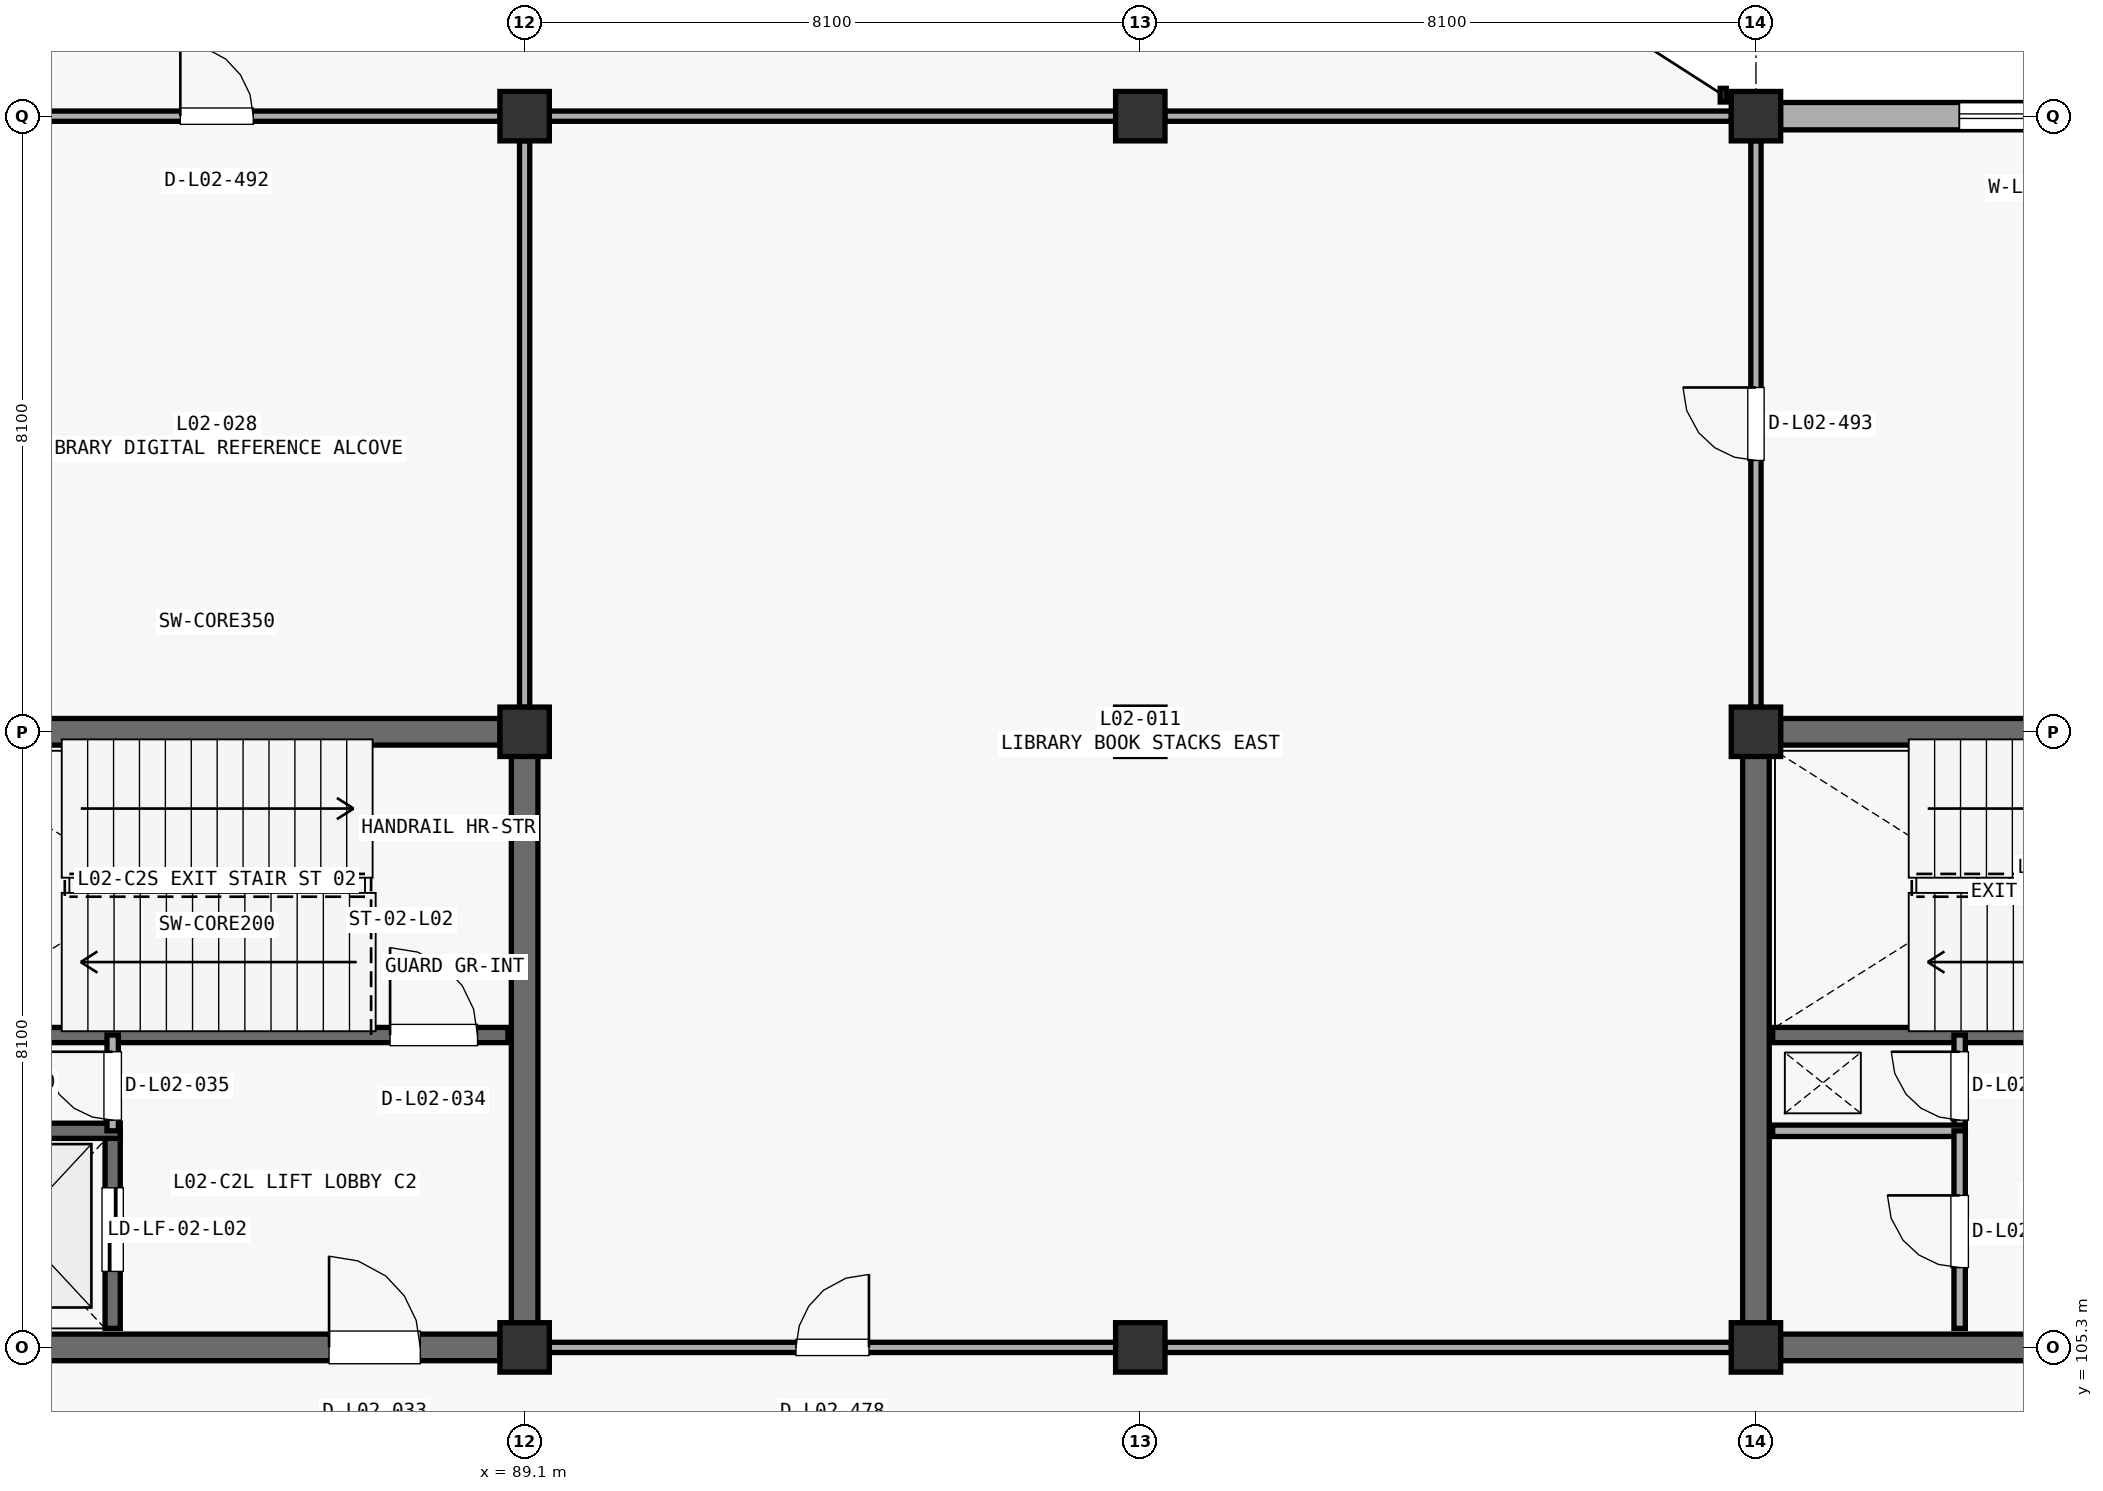
"""IFC4 building model, lengths in metres.
Left out: names, types, materials, properties, quantities, classifications, styles, units other than length and angle.
Written with IfcOpenShell. Run it as: python <this file> out.ifc"""

import sys

from ifc_helpers import new_model, si_unit, direction, frame, frame_2d, origin, origin_2d, place, context, subcontext, project, spatial, rectangle, extrude, element, fill, save


model = new_model("IFC4")
c1 = context("Model", 3, precision=1e-05, world=origin(), true_north=direction((0.0, 1.0)))
c2 = subcontext(c1, "Body", "Model", "MODEL_VIEW")
j1 = project(units=[si_unit("LENGTHUNIT", "METRE"), si_unit("PLANEANGLEUNIT", "RADIAN")], contexts=[c1])
p1 = place(None, origin())
s1 = spatial("IfcSite", under=j1, at=p1, CompositionType="ELEMENT")
p2 = place(p1, origin())
s2 = spatial("IfcBuilding", under=s1, at=p2, CompositionType="ELEMENT")
p3 = place(p2, frame((0.0, 0.0, 9.69)))
s3 = spatial("IfcBuildingStorey", under=s2, at=p3, CompositionType="ELEMENT", Elevation=9.69)
for number, where, z_axis, x_axis in (
    (1, (89.1, 105.3, 0.0), (0.0, 0.0, 1.0), (1.0, 0.0, 0.0)),
    (2, (89.1, 113.4, 0.0), (0.0, 0.0, 1.0), (1.0, 0.0, 0.0)),
    (3, (89.1, 121.5, 0.0), (0.0, 0.0, 1.0), (1.0, 0.0, 0.0)),
    (4, (97.2, 105.3, 0.0), (0.0, 0.0, 1.0), (1.0, 0.0, 0.0)),
    (5, (97.2, 113.4, 0.0), (0.0, 0.0, 1.0), (1.0, 0.0, 0.0)),
    (6, (97.2, 121.5, 0.0), (0.0, 0.0, 1.0), (1.0, 0.0, 0.0)),
    (7, (105.3, 105.3, 0.0), (0.0, 0.0, 1.0), (1.0, 0.0, 0.0)),
    (8, (105.3, 113.4, 0.0), (0.0, 0.0, 1.0), (1.0, 0.0, 0.0)),
    (9, (105.3, 121.5, 0.0), (0.0, 0.0, 1.0), (1.0, 0.0, 0.0)),
):
    element("IfcColumn", number, at=place(p3, frame(where, z_axis=z_axis, x_axis=x_axis)), inside=s3, PredefinedType="COLUMN", context=c2, shape_type="SweptSolid", body=[
        extrude(rectangle(XDim=0.65, YDim=0.65, at=origin_2d()), origin(), (0.0, 0.0, 1.0), 4.42),
    ])
p4 = place(p3, frame((105.623, 121.5, 0.0), z_axis=(0.0, 0.0, 1.0), x_axis=(1.0, 0.0, 0.0)))
e10 = element("IfcWall", 10, at=p4, inside=s3, PredefinedType="STANDARD", context=c2, shape_type="SweptSolid", body=[
    extrude(rectangle(XDim=7.454, YDim=0.36, at=frame_2d((3.727, 0.0))), origin(), (0.0, 0.0, 1.0), 3.492),
])
p5 = place(p4, frame((2.352, 0.0, 0.85)))
e11 = element("IfcOpeningElement", 11, at=p5, cuts=e10, PredefinedType="OPENING", context=c2, shape_type="SweptSolid", body=[
    extrude(rectangle(XDim=2.75, YDim=1.7, at=frame_2d((1.375, 0.85))), frame((0.0, 0.19, 0.0), z_axis=(0.0, -1.0, 0.0), x_axis=(1.0, 0.0, 0.0)), (0.0, 0.0, 1.0), 0.38),
])
p6 = place(p3, frame((81.323, 113.4, 0.0), z_axis=(0.0, 0.0, 1.0), x_axis=(1.0, 0.0, 0.0)))
e12 = element("IfcWall", 12, at=p6, inside=s3, PredefinedType="SHEAR", context=c2, shape_type="SweptSolid", body=[
    extrude(rectangle(XDim=7.454, YDim=0.35, at=frame_2d((3.727, 0.0))), origin(), (0.0, 0.0, 1.0), 4.142),
])
p7 = place(p3, frame((89.1, 105.623, 0.0), z_axis=(0.0, 0.0, 1.0), x_axis=(0.0, 1.0, 0.0)))
e13 = element("IfcWall", 13, at=p7, inside=s3, PredefinedType="SHEAR", context=c2, shape_type="SweptSolid", body=[
    extrude(rectangle(XDim=7.454, YDim=0.35, at=frame_2d((3.727, 0.0))), origin(), (0.0, 0.0, 1.0), 4.142),
])
p8 = place(p3, frame((81.323, 105.3, 0.0), z_axis=(0.0, 0.0, 1.0), x_axis=(1.0, 0.0, 0.0)))
e14 = element("IfcWall", 14, at=p8, inside=s3, PredefinedType="SHEAR", context=c2, shape_type="SweptSolid", body=[
    extrude(rectangle(XDim=7.454, YDim=0.35, at=frame_2d((3.727, 0.0))), origin(), (0.0, 0.0, 1.0), 4.142),
])
p9 = place(p8, frame((5.204, 0.0, 0.0)))
e15 = element("IfcOpeningElement", 15, at=p9, cuts=e14, PredefinedType="OPENING", context=c2, shape_type="SweptSolid", body=[
    extrude(rectangle(XDim=1.2, YDim=2.2, at=frame_2d((0.6, 1.1))), frame((0.0, 0.185, 0.0), z_axis=(0.0, -1.0, 0.0), x_axis=(1.0, 0.0, 0.0)), (0.0, 0.0, 1.0), 0.37),
])
p10 = place(p3, frame((81.22, 109.41, 0.0), z_axis=(0.0, 0.0, 1.0), x_axis=(1.0, 0.0, 0.0)))
e16 = element("IfcWall", 16, at=p10, inside=s3, PredefinedType="SHEAR", context=c2, shape_type="SweptSolid", body=[
    extrude(rectangle(XDim=7.66, YDim=0.2, at=frame_2d((3.83, 0.0))), origin(), (0.0, 0.0, 1.0), 4.142),
])
p11 = place(p10, frame((6.11, 0.0, 0.0)))
e17 = element("IfcOpeningElement", 17, at=p11, cuts=e16, PredefinedType="OPENING", context=c2, shape_type="SweptSolid", body=[
    extrude(rectangle(XDim=1.15, YDim=2.2, at=frame_2d((0.575, 1.1))), frame((0.0, 0.11, 0.0), z_axis=(0.0, -1.0, 0.0), x_axis=(1.0, 0.0, 0.0)), (0.0, 0.0, 1.0), 0.22),
])
p12 = place(p3, frame((83.68, 105.55, 0.0), z_axis=(0.0, 0.0, 1.0), x_axis=(0.0, 1.0, 0.0)))
e18 = element("IfcWall", 18, at=p12, inside=s3, PredefinedType="SHEAR", context=c2, shape_type="SweptSolid", body=[
    extrude(rectangle(XDim=2.6, YDim=0.2, at=frame_2d((1.3, 0.0))), origin(), (0.0, 0.0, 1.0), 4.142),
])
p13 = place(p12, frame((0.75, 0.0, 0.0)))
e19 = element("IfcOpeningElement", 19, at=p13, cuts=e18, PredefinedType="OPENING", context=c2, shape_type="SweptSolid", body=[
    extrude(rectangle(XDim=1.1, YDim=2.2, at=frame_2d((0.55, 1.1))), frame((0.0, 0.11, 0.0), z_axis=(0.0, -1.0, 0.0), x_axis=(1.0, 0.0, 0.0)), (0.0, 0.0, 1.0), 0.22),
])
p14 = place(p3, frame((81.22, 108.15, 0.0), z_axis=(0.0, 0.0, 1.0), x_axis=(1.0, 0.0, 0.0)))
e20 = element("IfcWall", 20, at=p14, inside=s3, PredefinedType="SHEAR", context=c2, shape_type="SweptSolid", body=[
    extrude(rectangle(XDim=2.56, YDim=0.2, at=frame_2d((1.28, 0.0))), origin(), (0.0, 0.0, 1.0), 4.142),
])
p15 = place(p3, frame((83.68, 108.15, 0.0), z_axis=(0.0, 0.0, 1.0), x_axis=(0.0, 1.0, 0.0)))
e21 = element("IfcWall", 21, at=p15, inside=s3, PredefinedType="PARTITIONING", context=c2, shape_type="SweptSolid", body=[
    extrude(rectangle(XDim=1.26, YDim=0.15, at=frame_2d((0.63, 0.0))), origin(), (0.0, 0.0, 1.0), 4.142),
])
p16 = place(p15, frame((0.14, 0.0, 0.0)))
e22 = element("IfcOpeningElement", 22, at=p16, cuts=e21, PredefinedType="OPENING", context=c2, shape_type="SweptSolid", body=[
    extrude(rectangle(XDim=0.9, YDim=2.15, at=frame_2d((0.45, 1.075))), frame((0.0, 0.085, 0.0), z_axis=(0.0, -1.0, 0.0), x_axis=(1.0, 0.0, 0.0)), (0.0, 0.0, 1.0), 0.17),
])
for number, where, z_axis, x_axis in (
    (23, (105.623, 113.4, 0.0), (0.0, 0.0, 1.0), (1.0, 0.0, 0.0)),
    (24, (105.3, 105.623, 0.0), (0.0, 0.0, 1.0), (0.0, 1.0, 0.0)),
):
    element("IfcWall", number, at=place(p3, frame(where, z_axis=z_axis, x_axis=x_axis)), inside=s3, PredefinedType="SHEAR", context=c2, shape_type="SweptSolid", body=[
        extrude(rectangle(XDim=7.454, YDim=0.35, at=frame_2d((3.727, 0.0))), origin(), (0.0, 0.0, 1.0), 4.142),
    ])
p17 = place(p3, frame((105.623, 105.3, 0.0), z_axis=(0.0, 0.0, 1.0), x_axis=(1.0, 0.0, 0.0)))
e25 = element("IfcWall", 25, at=p17, inside=s3, PredefinedType="SHEAR", context=c2, shape_type="SweptSolid", body=[
    extrude(rectangle(XDim=7.454, YDim=0.35, at=frame_2d((3.727, 0.0))), origin(), (0.0, 0.0, 1.0), 4.142),
])
p18 = place(p17, frame((5.204, 0.0, 0.0)))
e26 = element("IfcOpeningElement", 26, at=p18, cuts=e25, PredefinedType="OPENING", context=c2, shape_type="SweptSolid", body=[
    extrude(rectangle(XDim=1.2, YDim=2.2, at=frame_2d((0.6, 1.1))), frame((0.0, 0.185, 0.0), z_axis=(0.0, -1.0, 0.0), x_axis=(1.0, 0.0, 0.0)), (0.0, 0.0, 1.0), 0.37),
])
p19 = place(p3, frame((105.52, 109.41, 0.0), z_axis=(0.0, 0.0, 1.0), x_axis=(1.0, 0.0, 0.0)))
e27 = element("IfcWall", 27, at=p19, inside=s3, PredefinedType="SHEAR", context=c2, shape_type="SweptSolid", body=[
    extrude(rectangle(XDim=7.66, YDim=0.2, at=frame_2d((3.83, 0.0))), origin(), (0.0, 0.0, 1.0), 4.142),
])
p20 = place(p19, frame((6.11, 0.0, 0.0)))
e28 = element("IfcOpeningElement", 28, at=p20, cuts=e27, PredefinedType="OPENING", context=c2, shape_type="SweptSolid", body=[
    extrude(rectangle(XDim=1.15, YDim=2.2, at=frame_2d((0.575, 1.1))), frame((0.0, 0.11, 0.0), z_axis=(0.0, -1.0, 0.0), x_axis=(1.0, 0.0, 0.0)), (0.0, 0.0, 1.0), 0.22),
])
p21 = place(p3, frame((107.98, 108.15, 0.0), z_axis=(0.0, 0.0, 1.0), x_axis=(0.0, 1.0, 0.0)))
e29 = element("IfcWall", 29, at=p21, inside=s3, PredefinedType="PARTITIONING", context=c2, shape_type="SweptSolid", body=[
    extrude(rectangle(XDim=1.26, YDim=0.15, at=frame_2d((0.63, 0.0))), origin(), (0.0, 0.0, 1.0), 4.142),
])
p22 = place(p21, frame((0.14, 0.0, 0.0)))
e30 = element("IfcOpeningElement", 30, at=p22, cuts=e29, PredefinedType="OPENING", context=c2, shape_type="SweptSolid", body=[
    extrude(rectangle(XDim=0.9, YDim=2.15, at=frame_2d((0.45, 1.075))), frame((0.0, 0.085, 0.0), z_axis=(0.0, -1.0, 0.0), x_axis=(1.0, 0.0, 0.0)), (0.0, 0.0, 1.0), 0.17),
])
p23 = place(p3, frame((105.52, 108.15, 0.0), z_axis=(0.0, 0.0, 1.0), x_axis=(1.0, 0.0, 0.0)))
e31 = element("IfcWall", 31, at=p23, inside=s3, PredefinedType="PARTITIONING", context=c2, shape_type="SweptSolid", body=[
    extrude(rectangle(XDim=2.53, YDim=0.15, at=frame_2d((1.265, 0.0))), origin(), (0.0, 0.0, 1.0), 4.142),
])
p24 = place(p3, frame((107.98, 105.55, 0.0), z_axis=(0.0, 0.0, 1.0), x_axis=(0.0, 1.0, 0.0)))
e32 = element("IfcWall", 32, at=p24, inside=s3, PredefinedType="PARTITIONING", context=c2, shape_type="SweptSolid", body=[
    extrude(rectangle(XDim=2.6, YDim=0.15, at=frame_2d((1.3, 0.0))), origin(), (0.0, 0.0, 1.0), 4.142),
])
p25 = place(p24, frame((0.8, 0.0, 0.0)))
e33 = element("IfcOpeningElement", 33, at=p25, cuts=e32, PredefinedType="OPENING", context=c2, shape_type="SweptSolid", body=[
    extrude(rectangle(XDim=0.95, YDim=2.15, at=frame_2d((0.475, 1.075))), frame((0.0, 0.085, 0.0), z_axis=(0.0, -1.0, 0.0), x_axis=(1.0, 0.0, 0.0)), (0.0, 0.0, 1.0), 0.17),
])
p26 = place(p3, frame((89.423, 105.3, 0.0), z_axis=(0.0, 0.0, 1.0), x_axis=(1.0, 0.0, 0.0)))
e34 = element("IfcWall", 34, at=p26, inside=s3, PredefinedType="PARTITIONING", context=c2, shape_type="SweptSolid", body=[
    extrude(rectangle(XDim=7.454, YDim=0.135, at=frame_2d((3.727, 0.0))), origin(), (0.0, 0.0, 1.0), 3.542),
])
p27 = place(p26, frame((3.247, 0.0, 0.0)))
e35 = element("IfcOpeningElement", 35, at=p27, cuts=e34, PredefinedType="OPENING", context=c2, shape_type="SweptSolid", body=[
    extrude(rectangle(XDim=0.96, YDim=2.15, at=frame_2d((0.48, 1.075))), frame((0.0, 0.078, 0.0), z_axis=(0.0, -1.0, 0.0), x_axis=(1.0, 0.0, 0.0)), (0.0, 0.0, 1.0), 0.155),
])
p28 = place(p3, frame((97.523, 105.3, 0.0), z_axis=(0.0, 0.0, 1.0), x_axis=(1.0, 0.0, 0.0)))
e36 = element("IfcWall", 36, at=p28, inside=s3, PredefinedType="PARTITIONING", context=c2, shape_type="SweptSolid", body=[
    extrude(rectangle(XDim=7.454, YDim=0.135, at=frame_2d((3.727, 0.0))), origin(), (0.0, 0.0, 1.0), 3.292),
])
p29 = place(p3, frame((105.3, 113.723, 0.0), z_axis=(0.0, 0.0, 1.0), x_axis=(0.0, 1.0, 0.0)))
e37 = element("IfcWall", 37, at=p29, inside=s3, PredefinedType="PARTITIONING", context=c2, shape_type="SweptSolid", body=[
    extrude(rectangle(XDim=7.454, YDim=0.135, at=frame_2d((3.727, 0.0))), origin(), (0.0, 0.0, 1.0), 3.292),
])
p30 = place(p29, frame((3.247, 0.0, 0.0)))
e38 = element("IfcOpeningElement", 38, at=p30, cuts=e37, PredefinedType="OPENING", context=c2, shape_type="SweptSolid", body=[
    extrude(rectangle(XDim=0.96, YDim=2.15, at=frame_2d((0.48, 1.075))), frame((0.0, 0.078, 0.0), z_axis=(0.0, -1.0, 0.0), x_axis=(1.0, 0.0, 0.0)), (0.0, 0.0, 1.0), 0.155),
])
p31 = place(p3, frame((89.1, 113.723, 0.0), z_axis=(0.0, 0.0, 1.0), x_axis=(0.0, 1.0, 0.0)))
e39 = element("IfcWall", 39, at=p31, inside=s3, PredefinedType="PARTITIONING", context=c2, shape_type="SweptSolid", body=[
    extrude(rectangle(XDim=7.454, YDim=0.135, at=frame_2d((3.727, 0.0))), origin(), (0.0, 0.0, 1.0), 3.192),
])
p32 = place(p3, frame((89.423, 121.5, 0.0), z_axis=(0.0, 0.0, 1.0), x_axis=(1.0, 0.0, 0.0)))
e40 = element("IfcWall", 40, at=p32, inside=s3, PredefinedType="PARTITIONING", context=c2, shape_type="SweptSolid", body=[
    extrude(rectangle(XDim=7.454, YDim=0.135, at=frame_2d((3.727, 0.0))), origin(), (0.0, 0.0, 1.0), 3.192),
])
p33 = place(p3, frame((97.523, 121.5, 0.0), z_axis=(0.0, 0.0, 1.0), x_axis=(1.0, 0.0, 0.0)))
e41 = element("IfcWall", 41, at=p33, inside=s3, PredefinedType="PARTITIONING", context=c2, shape_type="SweptSolid", body=[
    extrude(rectangle(XDim=7.454, YDim=0.135, at=frame_2d((3.727, 0.0))), origin(), (0.0, 0.0, 1.0), 3.492),
])
p34 = place(p3, frame((81.323, 121.5, 0.0), z_axis=(0.0, 0.0, 1.0), x_axis=(1.0, 0.0, 0.0)))
e42 = element("IfcWall", 42, at=p34, inside=s3, PredefinedType="PARTITIONING", context=c2, shape_type="SweptSolid", body=[
    extrude(rectangle(XDim=7.454, YDim=0.135, at=frame_2d((3.727, 0.0))), origin(), (0.0, 0.0, 1.0), 3.292),
])
p35 = place(p34, frame((3.247, 0.0, 0.0)))
e43 = element("IfcOpeningElement", 43, at=p35, cuts=e42, PredefinedType="OPENING", context=c2, shape_type="SweptSolid", body=[
    extrude(rectangle(XDim=0.96, YDim=2.15, at=frame_2d((0.48, 1.075))), frame((0.0, 0.078, 0.0), z_axis=(0.0, -1.0, 0.0), x_axis=(1.0, 0.0, 0.0)), (0.0, 0.0, 1.0), 0.155),
])
p36 = place(p5, origin())
e44 = element("IfcWindow", 44, at=p36, inside=s3, PartitioningType="SINGLE_PANEL", PredefinedType="WINDOW", context=c2, shape_type="SweptSolid", body=[
    extrude(rectangle(XDim=2.75, YDim=1.7, at=frame_2d((1.375, 0.85))), frame((0.0, 0.03, 0.0), z_axis=(0.0, -1.0, 0.0), x_axis=(1.0, 0.0, 0.0)), (0.0, 0.0, 1.0), 0.06),
])
fill(e11, e44)
p37 = place(p9, origin())
e45 = element("IfcDoor", 45, at=p37, inside=s3, OperationType="SINGLE_SWING_LEFT", PredefinedType="DOOR", context=c2, shape_type="SweptSolid", body=[
    extrude(rectangle(XDim=1.2, YDim=2.2, at=frame_2d((0.6, 1.1))), frame((0.0, 0.025, 0.0), z_axis=(0.0, -1.0, 0.0), x_axis=(1.0, 0.0, 0.0)), (0.0, 0.0, 1.0), 0.05),
])
fill(e15, e45)
p38 = place(p11, origin())
e46 = element("IfcDoor", 46, at=p38, inside=s3, OperationType="SINGLE_SWING_LEFT", PredefinedType="DOOR", context=c2, shape_type="SweptSolid", body=[
    extrude(rectangle(XDim=1.15, YDim=2.2, at=frame_2d((0.575, 1.1))), frame((0.0, 0.025, 0.0), z_axis=(0.0, -1.0, 0.0), x_axis=(1.0, 0.0, 0.0)), (0.0, 0.0, 1.0), 0.05),
])
fill(e17, e46)
p39 = place(p13, origin())
e47 = element("IfcDoor", 47, at=p39, inside=s3, OperationType="SLIDING_TO_LEFT", PredefinedType="DOOR", context=c2, shape_type="SweptSolid", body=[
    extrude(rectangle(XDim=1.1, YDim=2.2, at=frame_2d((0.55, 1.1))), frame((0.0, 0.025, 0.0), z_axis=(0.0, -1.0, 0.0), x_axis=(1.0, 0.0, 0.0)), (0.0, 0.0, 1.0), 0.05),
])
fill(e19, e47)
p40 = place(p16, origin())
e48 = element("IfcDoor", 48, at=p40, inside=s3, OperationType="SINGLE_SWING_RIGHT", PredefinedType="DOOR", context=c2, shape_type="SweptSolid", body=[
    extrude(rectangle(XDim=0.9, YDim=2.15, at=frame_2d((0.45, 1.075))), frame((0.0, 0.025, 0.0), z_axis=(0.0, -1.0, 0.0), x_axis=(1.0, 0.0, 0.0)), (0.0, 0.0, 1.0), 0.05),
])
fill(e22, e48)
p41 = place(p22, origin())
e49 = element("IfcDoor", 49, at=p41, inside=s3, OperationType="SINGLE_SWING_RIGHT", PredefinedType="DOOR", context=c2, shape_type="SweptSolid", body=[
    extrude(rectangle(XDim=0.9, YDim=2.15, at=frame_2d((0.45, 1.075))), frame((0.0, 0.025, 0.0), z_axis=(0.0, -1.0, 0.0), x_axis=(1.0, 0.0, 0.0)), (0.0, 0.0, 1.0), 0.05),
])
fill(e30, e49)
p42 = place(p25, origin())
e50 = element("IfcDoor", 50, at=p42, inside=s3, OperationType="SINGLE_SWING_RIGHT", PredefinedType="DOOR", context=c2, shape_type="SweptSolid", body=[
    extrude(rectangle(XDim=0.95, YDim=2.15, at=frame_2d((0.475, 1.075))), frame((0.0, 0.025, 0.0), z_axis=(0.0, -1.0, 0.0), x_axis=(1.0, 0.0, 0.0)), (0.0, 0.0, 1.0), 0.05),
])
fill(e33, e50)
p43 = place(p27, origin())
e51 = element("IfcDoor", 51, at=p43, inside=s3, OperationType="SINGLE_SWING_RIGHT", PredefinedType="DOOR", context=c2, shape_type="SweptSolid", body=[
    extrude(rectangle(XDim=0.96, YDim=2.15, at=frame_2d((0.48, 1.075))), frame((0.0, 0.025, 0.0), z_axis=(0.0, -1.0, 0.0), x_axis=(1.0, 0.0, 0.0)), (0.0, 0.0, 1.0), 0.05),
])
fill(e35, e51)
p44 = place(p35, origin())
e52 = element("IfcDoor", 52, at=p44, inside=s3, OperationType="SINGLE_SWING_LEFT", PredefinedType="DOOR", context=c2, shape_type="SweptSolid", body=[
    extrude(rectangle(XDim=0.96, YDim=2.15, at=frame_2d((0.48, 1.075))), frame((0.0, 0.025, 0.0), z_axis=(0.0, -1.0, 0.0), x_axis=(1.0, 0.0, 0.0)), (0.0, 0.0, 1.0), 0.05),
])
fill(e43, e52)
p45 = place(p30, origin())
e53 = element("IfcDoor", 53, at=p45, inside=s3, OperationType="SINGLE_SWING_RIGHT", PredefinedType="DOOR", context=c2, shape_type="SweptSolid", body=[
    extrude(rectangle(XDim=0.96, YDim=2.15, at=frame_2d((0.48, 1.075))), frame((0.0, 0.025, 0.0), z_axis=(0.0, -1.0, 0.0), x_axis=(1.0, 0.0, 0.0)), (0.0, 0.0, 1.0), 0.05),
])
fill(e38, e53)
save(model, sys.argv[1])
